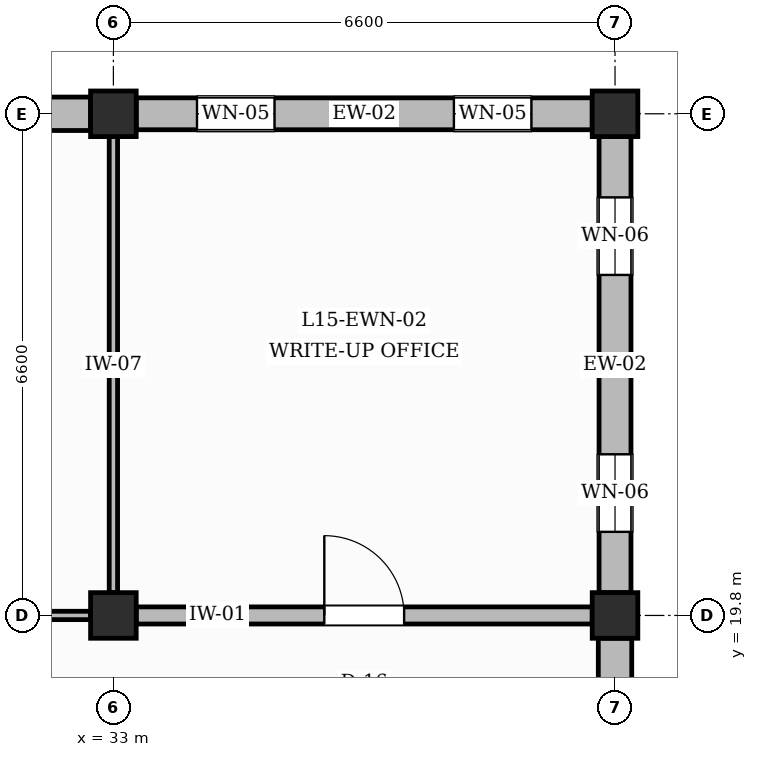
"""IFC4 building model, lengths in metres.
Left out: names, types, materials, properties, quantities, classifications, styles, units other than length and angle.
Written with IfcOpenShell. Run it as: python <this file> out.ifc"""

import sys

from ifc_helpers import new_model, si_unit, direction, frame, frame_2d, origin, origin_2d, place, context, subcontext, project, spatial, rectangle, extrude, element, fill, save


model = new_model("IFC4")
c1 = context("Model", 3, precision=1e-05, world=origin(), true_north=direction((0.0, 1.0)))
c2 = subcontext(c1, "Body", "Model", "MODEL_VIEW")
j1 = project(units=[si_unit("LENGTHUNIT", "METRE"), si_unit("PLANEANGLEUNIT", "RADIAN")], contexts=[c1])
p1 = place(None, origin())
s1 = spatial("IfcSite", under=j1, at=p1, CompositionType="ELEMENT")
p2 = place(p1, origin())
s2 = spatial("IfcBuilding", under=s1, at=p2, CompositionType="ELEMENT")
p3 = place(p2, frame((0.0, 0.0, 64.8)))
s3 = spatial("IfcBuildingStorey", under=s2, at=p3, CompositionType="ELEMENT", Elevation=64.8)
for number, where, z_axis, x_axis in (
    (1, (33.0, 19.8, 0.0), (0.0, 0.0, 1.0), (1.0, 0.0, 0.0)),
    (2, (33.0, 26.4, 0.0), (0.0, 0.0, 1.0), (1.0, 0.0, 0.0)),
    (3, (39.6, 19.8, 0.0), (0.0, 0.0, 1.0), (1.0, 0.0, 0.0)),
    (4, (39.6, 26.4, 0.0), (0.0, 0.0, 1.0), (1.0, 0.0, 0.0)),
):
    element("IfcColumn", number, at=place(p3, frame(where, z_axis=z_axis, x_axis=x_axis)), inside=s3, PredefinedType="COLUMN", context=c2, shape_type="SweptSolid", body=[
        extrude(rectangle(XDim=0.6, YDim=0.6, at=origin_2d()), origin(), (0.0, 0.0, 1.0), 4.2),
    ])
p4 = place(p3, frame((26.7, 26.4, 0.0), z_axis=(0.0, 0.0, 1.0), x_axis=(1.0, 0.0, 0.0)))
e5 = element("IfcWall", 5, at=p4, inside=s3, PredefinedType="SOLIDWALL", context=c2, shape_type="SweptSolid", body=[
    extrude(rectangle(XDim=6.0, YDim=0.44, at=frame_2d((3.0, 0.0))), origin(), (0.0, 0.0, 1.0), 3.3),
])
p5 = place(p4, frame((0.8, 0.0, 0.95)))
e6 = element("IfcOpeningElement", 6, at=p5, cuts=e5, PredefinedType="OPENING", context=c2, shape_type="SweptSolid", body=[
    extrude(rectangle(XDim=0.88, YDim=1.52, at=frame_2d((0.44, 0.76))), frame((0.0, 0.23, 0.0), z_axis=(0.0, -1.0, 0.0), x_axis=(1.0, 0.0, 0.0)), (0.0, 0.0, 1.0), 0.46),
])
p6 = place(p4, frame((4.32, 0.0, 0.95)))
e7 = element("IfcOpeningElement", 7, at=p6, cuts=e5, PredefinedType="OPENING", context=c2, shape_type="SweptSolid", body=[
    extrude(rectangle(XDim=0.88, YDim=1.52, at=frame_2d((0.44, 0.76))), frame((0.0, 0.23, 0.0), z_axis=(0.0, -1.0, 0.0), x_axis=(1.0, 0.0, 0.0)), (0.0, 0.0, 1.0), 0.46),
])
p7 = place(p3, frame((39.6, 13.5, 0.0), z_axis=(0.0, 0.0, 1.0), x_axis=(0.0, 1.0, 0.0)))
e8 = element("IfcWall", 8, at=p7, inside=s3, PredefinedType="SOLIDWALL", context=c2, shape_type="SweptSolid", body=[
    extrude(rectangle(XDim=6.0, YDim=0.44, at=frame_2d((3.0, 0.0))), origin(), (0.0, 0.0, 1.0), 3.3),
])
p8 = place(p7, frame((0.8, 0.0, 0.95)))
e9 = element("IfcOpeningElement", 9, at=p8, cuts=e8, PredefinedType="OPENING", context=c2, shape_type="SweptSolid", body=[
    extrude(rectangle(XDim=0.88, YDim=1.96, at=frame_2d((0.44, 0.98))), frame((0.0, 0.23, 0.0), z_axis=(0.0, -1.0, 0.0), x_axis=(1.0, 0.0, 0.0)), (0.0, 0.0, 1.0), 0.46),
])
p9 = place(p7, frame((4.32, 0.0, 0.95)))
e10 = element("IfcOpeningElement", 10, at=p9, cuts=e8, PredefinedType="OPENING", context=c2, shape_type="SweptSolid", body=[
    extrude(rectangle(XDim=0.88, YDim=1.96, at=frame_2d((0.44, 0.98))), frame((0.0, 0.23, 0.0), z_axis=(0.0, -1.0, 0.0), x_axis=(1.0, 0.0, 0.0)), (0.0, 0.0, 1.0), 0.46),
])
p10 = place(p3, frame((33.3, 26.4, 0.0), z_axis=(0.0, 0.0, 1.0), x_axis=(1.0, 0.0, 0.0)))
e11 = element("IfcWall", 11, at=p10, inside=s3, PredefinedType="SOLIDWALL", context=c2, shape_type="SweptSolid", body=[
    extrude(rectangle(XDim=6.0, YDim=0.42, at=frame_2d((3.0, 0.0))), origin(), (0.0, 0.0, 1.0), 3.3),
])
p11 = place(p10, frame((0.8, 0.0, 0.95)))
e12 = element("IfcOpeningElement", 12, at=p11, cuts=e11, PredefinedType="OPENING", context=c2, shape_type="SweptSolid", body=[
    extrude(rectangle(XDim=1.02, YDim=1.3, at=frame_2d((0.51, 0.65))), frame((0.0, 0.22, 0.0), z_axis=(0.0, -1.0, 0.0), x_axis=(1.0, 0.0, 0.0)), (0.0, 0.0, 1.0), 0.44),
])
p12 = place(p10, frame((4.18, 0.0, 0.95)))
e13 = element("IfcOpeningElement", 13, at=p12, cuts=e11, PredefinedType="OPENING", context=c2, shape_type="SweptSolid", body=[
    extrude(rectangle(XDim=1.02, YDim=1.3, at=frame_2d((0.51, 0.65))), frame((0.0, 0.22, 0.0), z_axis=(0.0, -1.0, 0.0), x_axis=(1.0, 0.0, 0.0)), (0.0, 0.0, 1.0), 0.44),
])
p13 = place(p3, frame((39.6, 20.1, 0.0), z_axis=(0.0, 0.0, 1.0), x_axis=(0.0, 1.0, 0.0)))
e14 = element("IfcWall", 14, at=p13, inside=s3, PredefinedType="SOLIDWALL", context=c2, shape_type="SweptSolid", body=[
    extrude(rectangle(XDim=6.0, YDim=0.42, at=frame_2d((3.0, 0.0))), origin(), (0.0, 0.0, 1.0), 3.3),
])
p14 = place(p13, frame((0.8, 0.0, 0.95)))
e15 = element("IfcOpeningElement", 15, at=p14, cuts=e14, PredefinedType="OPENING", context=c2, shape_type="SweptSolid", body=[
    extrude(rectangle(XDim=1.02, YDim=1.52, at=frame_2d((0.51, 0.76))), frame((0.0, 0.22, 0.0), z_axis=(0.0, -1.0, 0.0), x_axis=(1.0, 0.0, 0.0)), (0.0, 0.0, 1.0), 0.44),
])
p15 = place(p13, frame((4.18, 0.0, 0.95)))
e16 = element("IfcOpeningElement", 16, at=p15, cuts=e14, PredefinedType="OPENING", context=c2, shape_type="SweptSolid", body=[
    extrude(rectangle(XDim=1.02, YDim=1.52, at=frame_2d((0.51, 0.76))), frame((0.0, 0.22, 0.0), z_axis=(0.0, -1.0, 0.0), x_axis=(1.0, 0.0, 0.0)), (0.0, 0.0, 1.0), 0.44),
])
p16 = place(p3, frame((26.7, 19.8, 0.0), z_axis=(0.0, 0.0, 1.0), x_axis=(1.0, 0.0, 0.0)))
e17 = element("IfcWall", 17, at=p16, inside=s3, PredefinedType="PARTITIONING", context=c2, shape_type="SweptSolid", body=[
    extrude(rectangle(XDim=6.0, YDim=0.11, at=frame_2d((3.0, 0.0))), origin(), (0.0, 0.0, 1.0), 3.3),
])
p17 = place(p16, frame((2.375, 0.0, 0.0)))
e18 = element("IfcOpeningElement", 18, at=p17, cuts=e17, PredefinedType="OPENING", context=c2, shape_type="SweptSolid", body=[
    extrude(rectangle(XDim=1.25, YDim=2.25, at=frame_2d((0.625, 1.125))), frame((0.0, 0.065, 0.0), z_axis=(0.0, -1.0, 0.0), x_axis=(1.0, 0.0, 0.0)), (0.0, 0.0, 1.0), 0.13),
])
p18 = place(p3, frame((33.0, 20.1, 0.0), z_axis=(0.0, 0.0, 1.0), x_axis=(0.0, 1.0, 0.0)))
e19 = element("IfcWall", 19, at=p18, inside=s3, PredefinedType="PARTITIONING", context=c2, shape_type="SweptSolid", body=[
    extrude(rectangle(XDim=6.0, YDim=0.11, at=frame_2d((3.0, 0.0))), origin(), (0.0, 0.0, 1.0), 3.3),
])
p19 = place(p3, frame((33.3, 19.8, 0.0), z_axis=(0.0, 0.0, 1.0), x_axis=(1.0, 0.0, 0.0)))
e20 = element("IfcWall", 20, at=p19, inside=s3, PredefinedType="PARTITIONING", context=c2, shape_type="SweptSolid", body=[
    extrude(rectangle(XDim=6.0, YDim=0.225, at=frame_2d((3.0, 0.0))), origin(), (0.0, 0.0, 1.0), 3.3),
])
p20 = place(p19, frame((2.475, 0.0, 0.0)))
e21 = element("IfcOpeningElement", 21, at=p20, cuts=e20, PredefinedType="OPENING", context=c2, shape_type="SweptSolid", body=[
    extrude(rectangle(XDim=1.05, YDim=2.15, at=frame_2d((0.525, 1.075))), frame((0.0, 0.123, 0.0), z_axis=(0.0, -1.0, 0.0), x_axis=(1.0, 0.0, 0.0)), (0.0, 0.0, 1.0), 0.245),
])
p21 = place(p11, origin())
e22 = element("IfcWindow", 22, at=p21, inside=s3, PartitioningType="SINGLE_PANEL", PredefinedType="WINDOW", context=c2, shape_type="SweptSolid", body=[
    extrude(rectangle(XDim=1.02, YDim=1.3, at=frame_2d((0.51, 0.65))), frame((0.0, 0.03, 0.0), z_axis=(0.0, -1.0, 0.0), x_axis=(1.0, 0.0, 0.0)), (0.0, 0.0, 1.0), 0.06),
])
fill(e12, e22)
p22 = place(p12, origin())
e23 = element("IfcWindow", 23, at=p22, inside=s3, PartitioningType="SINGLE_PANEL", PredefinedType="WINDOW", context=c2, shape_type="SweptSolid", body=[
    extrude(rectangle(XDim=1.02, YDim=1.3, at=frame_2d((0.51, 0.65))), frame((0.0, 0.03, 0.0), z_axis=(0.0, -1.0, 0.0), x_axis=(1.0, 0.0, 0.0)), (0.0, 0.0, 1.0), 0.06),
])
fill(e13, e23)
p23 = place(p14, origin())
e24 = element("IfcWindow", 24, at=p23, inside=s3, PartitioningType="SINGLE_PANEL", PredefinedType="WINDOW", context=c2, shape_type="SweptSolid", body=[
    extrude(rectangle(XDim=1.02, YDim=1.52, at=frame_2d((0.51, 0.76))), frame((0.0, 0.03, 0.0), z_axis=(0.0, -1.0, 0.0), x_axis=(1.0, 0.0, 0.0)), (0.0, 0.0, 1.0), 0.06),
])
fill(e15, e24)
p24 = place(p15, origin())
e25 = element("IfcWindow", 25, at=p24, inside=s3, PartitioningType="SINGLE_PANEL", PredefinedType="WINDOW", context=c2, shape_type="SweptSolid", body=[
    extrude(rectangle(XDim=1.02, YDim=1.52, at=frame_2d((0.51, 0.76))), frame((0.0, 0.03, 0.0), z_axis=(0.0, -1.0, 0.0), x_axis=(1.0, 0.0, 0.0)), (0.0, 0.0, 1.0), 0.06),
])
fill(e16, e25)
p25 = place(p20, origin())
e26 = element("IfcDoor", 26, at=p25, inside=s3, OperationType="SINGLE_SWING_LEFT", PredefinedType="DOOR", context=c2, shape_type="SweptSolid", body=[
    extrude(rectangle(XDim=1.05, YDim=2.15, at=frame_2d((0.525, 1.075))), frame((0.0, 0.025, 0.0), z_axis=(0.0, -1.0, 0.0), x_axis=(1.0, 0.0, 0.0)), (0.0, 0.0, 1.0), 0.05),
])
fill(e21, e26)
save(model, sys.argv[1])
